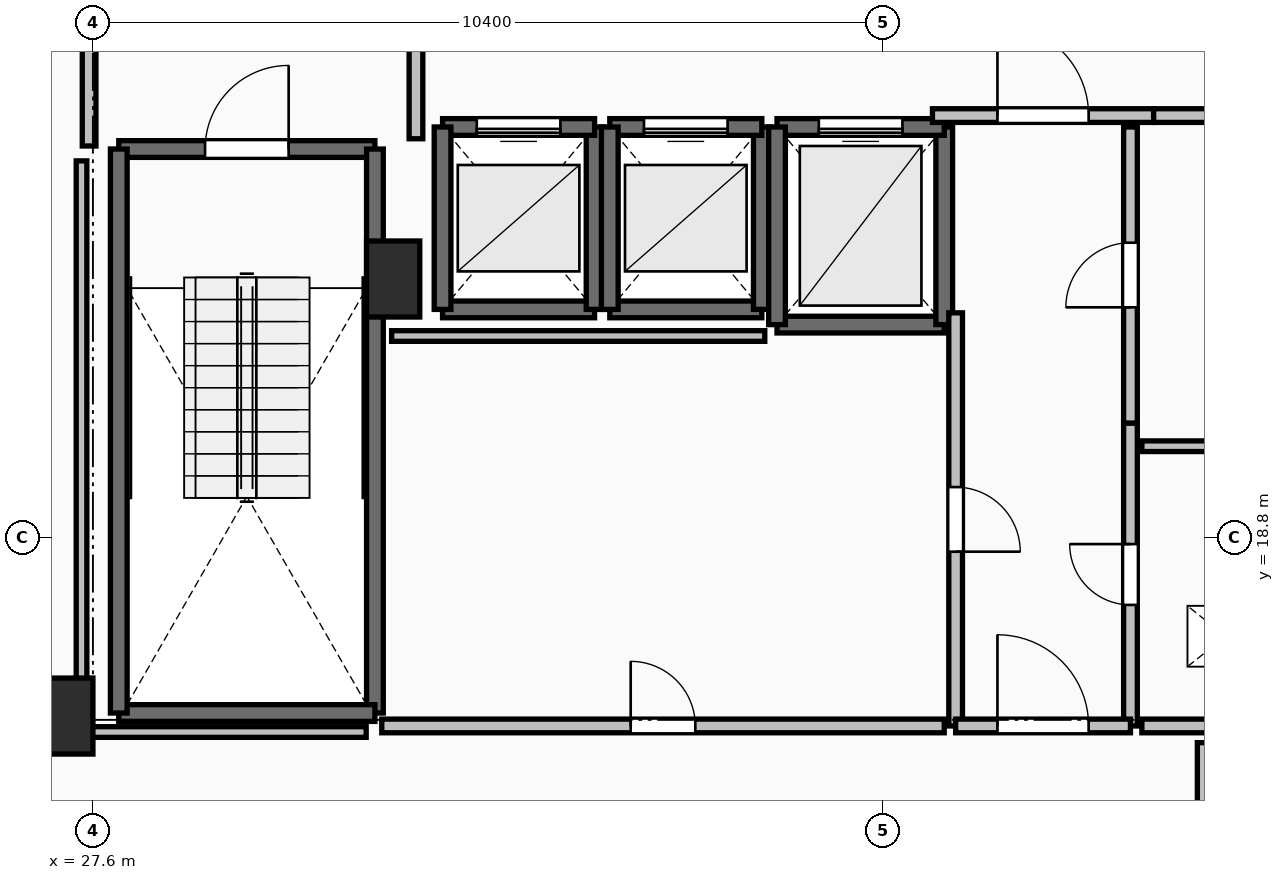
"""IFC4 building model, lengths in metres.
Left out: names, types, materials, properties, quantities, classifications, styles, units other than length and angle.
Written with IfcOpenShell. Run it as: python <this file> out.ifc"""

import sys

from ifc_helpers import new_model, si_unit, direction, frame, frame_2d, origin, origin_2d, place, context, subcontext, project, spatial, rectangle, extrude, element, fill, save


model = new_model("IFC4")
c1 = context("Model", 3, precision=1e-05, world=origin(), true_north=direction((0.0, 1.0)))
c2 = subcontext(c1, "Body", "Model", "MODEL_VIEW")
j1 = project(units=[si_unit("LENGTHUNIT", "METRE"), si_unit("PLANEANGLEUNIT", "RADIAN")], contexts=[c1])
p1 = place(None, origin())
s1 = spatial("IfcSite", under=j1, at=p1, CompositionType="ELEMENT")
p2 = place(p1, origin())
s2 = spatial("IfcBuilding", under=s1, at=p2, CompositionType="ELEMENT")
p3 = place(p2, frame((0.0, 0.0, 207.2)))
s3 = spatial("IfcBuildingStorey", under=s2, at=p3, CompositionType="ELEMENT", Elevation=207.2)
for number, where, z_axis, x_axis in (
    (1, (27.25, 16.45, 0.0), (0.0, 0.0, 1.0), (1.0, 0.0, 0.0)),
    (2, (31.55, 22.2, 0.0), (0.0, 0.0, 1.0), (1.0, 0.0, 0.0)),
):
    element("IfcColumn", number, at=place(p3, frame(where, z_axis=z_axis, x_axis=x_axis)), inside=s3, PredefinedType="PILASTER", context=c2, shape_type="SweptSolid", body=[
        extrude(rectangle(XDim=0.7, YDim=1.0, at=origin_2d()), origin(), (0.0, 0.0, 1.0), 3.55),
    ])
p4 = place(p3, frame((27.94, 23.91, 0.0), z_axis=(0.0, 0.0, 1.0), x_axis=(1.0, 0.0, 0.0)))
e3 = element("IfcWall", 3, at=p4, inside=s3, PredefinedType="SOLIDWALL", context=c2, shape_type="SweptSolid", body=[
    extrude(rectangle(XDim=3.37, YDim=0.22, at=frame_2d((1.685, 0.0))), origin(), (0.0, 0.0, 1.0), 3.29),
])
p5 = place(p4, frame((1.135, 0.0, 0.0)))
e4 = element("IfcOpeningElement", 4, at=p5, cuts=e3, PredefinedType="OPENING", context=c2, shape_type="SweptSolid", body=[
    extrude(rectangle(XDim=1.1, YDim=2.15, at=frame_2d((0.55, 1.075))), frame((0.0, 0.125, 0.0), z_axis=(0.0, -1.0, 0.0), x_axis=(1.0, 0.0, 0.0)), (0.0, 0.0, 1.0), 0.25),
])
p6 = place(p3, frame((31.31, 23.91, 0.0), z_axis=(0.0, 0.0, 1.0), x_axis=(0.0, -1.0, 0.0)))
e5 = element("IfcWall", 5, at=p6, inside=s3, PredefinedType="SOLIDWALL", context=c2, shape_type="SweptSolid", body=[
    extrude(rectangle(XDim=7.42, YDim=0.22, at=frame_2d((3.71, 0.0))), origin(), (0.0, 0.0, 1.0), 3.29),
])
p7 = place(p3, frame((31.31, 16.49, 0.0), z_axis=(0.0, 0.0, 1.0), x_axis=(-1.0, 0.0, 0.0)))
e6 = element("IfcWall", 6, at=p7, inside=s3, PredefinedType="SOLIDWALL", context=c2, shape_type="SweptSolid", body=[
    extrude(rectangle(XDim=3.37, YDim=0.22, at=frame_2d((1.685, 0.0))), origin(), (0.0, 0.0, 1.0), 3.29),
])
p8 = place(p3, frame((27.94, 16.49, 0.0), z_axis=(0.0, 0.0, 1.0), x_axis=(0.0, 1.0, 0.0)))
e7 = element("IfcWall", 7, at=p8, inside=s3, PredefinedType="SOLIDWALL", context=c2, shape_type="SweptSolid", body=[
    extrude(rectangle(XDim=7.42, YDim=0.22, at=frame_2d((3.71, 0.0))), origin(), (0.0, 0.0, 1.0), 3.29),
])
p9 = place(p3, frame((32.2, 21.8, 0.0), z_axis=(0.0, 0.0, 1.0), x_axis=(1.0, 0.0, 0.0)))
e8 = element("IfcWall", 8, at=p9, inside=s3, PredefinedType="SOLIDWALL", context=c2, shape_type="SweptSolid", body=[
    extrude(rectangle(XDim=2.0, YDim=0.22, at=frame_2d((1.0, 0.0))), origin(), (0.0, 0.0, 1.0), 3.29),
])
p10 = place(p3, frame((34.2, 21.8, 0.0), z_axis=(0.0, 0.0, 1.0), x_axis=(0.0, 1.0, 0.0)))
e9 = element("IfcWall", 9, at=p10, inside=s3, PredefinedType="SOLIDWALL", context=c2, shape_type="SweptSolid", body=[
    extrude(rectangle(XDim=2.4, YDim=0.22, at=frame_2d((1.2, 0.0))), origin(), (0.0, 0.0, 1.0), 3.29),
])
p11 = place(p3, frame((34.2, 24.2, 0.0), z_axis=(0.0, 0.0, 1.0), x_axis=(-1.0, 0.0, 0.0)))
e10 = element("IfcWall", 10, at=p11, inside=s3, PredefinedType="SOLIDWALL", context=c2, shape_type="SweptSolid", body=[
    extrude(rectangle(XDim=2.0, YDim=0.22, at=frame_2d((1.0, 0.0))), origin(), (0.0, 0.0, 1.0), 3.29),
])
p12 = place(p11, frame((0.45, 0.0, 0.0)))
e11 = element("IfcOpeningElement", 11, at=p12, cuts=e10, PredefinedType="OPENING", context=c2, shape_type="SweptSolid", body=[
    extrude(rectangle(XDim=1.1, YDim=2.2, at=frame_2d((0.55, 1.1))), frame((0.0, 0.125, 0.0), z_axis=(0.0, -1.0, 0.0), x_axis=(1.0, 0.0, 0.0)), (0.0, 0.0, 1.0), 0.25),
])
p13 = place(p3, frame((32.2, 24.2, 0.0), z_axis=(0.0, 0.0, 1.0), x_axis=(0.0, -1.0, 0.0)))
e12 = element("IfcWall", 12, at=p13, inside=s3, PredefinedType="SOLIDWALL", context=c2, shape_type="SweptSolid", body=[
    extrude(rectangle(XDim=2.4, YDim=0.22, at=frame_2d((1.2, 0.0))), origin(), (0.0, 0.0, 1.0), 3.29),
])
p14 = place(p3, frame((34.4, 21.8, 0.0), z_axis=(0.0, 0.0, 1.0), x_axis=(1.0, 0.0, 0.0)))
e13 = element("IfcWall", 13, at=p14, inside=s3, PredefinedType="SOLIDWALL", context=c2, shape_type="SweptSolid", body=[
    extrude(rectangle(XDim=2.0, YDim=0.22, at=frame_2d((1.0, 0.0))), origin(), (0.0, 0.0, 1.0), 3.29),
])
p15 = place(p3, frame((36.4, 21.8, 0.0), z_axis=(0.0, 0.0, 1.0), x_axis=(0.0, 1.0, 0.0)))
e14 = element("IfcWall", 14, at=p15, inside=s3, PredefinedType="SOLIDWALL", context=c2, shape_type="SweptSolid", body=[
    extrude(rectangle(XDim=2.4, YDim=0.22, at=frame_2d((1.2, 0.0))), origin(), (0.0, 0.0, 1.0), 3.29),
])
p16 = place(p3, frame((36.4, 24.2, 0.0), z_axis=(0.0, 0.0, 1.0), x_axis=(-1.0, 0.0, 0.0)))
e15 = element("IfcWall", 15, at=p16, inside=s3, PredefinedType="SOLIDWALL", context=c2, shape_type="SweptSolid", body=[
    extrude(rectangle(XDim=2.0, YDim=0.22, at=frame_2d((1.0, 0.0))), origin(), (0.0, 0.0, 1.0), 3.29),
])
p17 = place(p16, frame((0.45, 0.0, 0.0)))
e16 = element("IfcOpeningElement", 16, at=p17, cuts=e15, PredefinedType="OPENING", context=c2, shape_type="SweptSolid", body=[
    extrude(rectangle(XDim=1.1, YDim=2.2, at=frame_2d((0.55, 1.1))), frame((0.0, 0.125, 0.0), z_axis=(0.0, -1.0, 0.0), x_axis=(1.0, 0.0, 0.0)), (0.0, 0.0, 1.0), 0.25),
])
p18 = place(p3, frame((34.4, 24.2, 0.0), z_axis=(0.0, 0.0, 1.0), x_axis=(0.0, -1.0, 0.0)))
e17 = element("IfcWall", 17, at=p18, inside=s3, PredefinedType="SOLIDWALL", context=c2, shape_type="SweptSolid", body=[
    extrude(rectangle(XDim=2.4, YDim=0.22, at=frame_2d((1.2, 0.0))), origin(), (0.0, 0.0, 1.0), 3.29),
])
p19 = place(p3, frame((36.6, 21.6, 0.0), z_axis=(0.0, 0.0, 1.0), x_axis=(1.0, 0.0, 0.0)))
e18 = element("IfcWall", 18, at=p19, inside=s3, PredefinedType="SOLIDWALL", context=c2, shape_type="SweptSolid", body=[
    extrude(rectangle(XDim=2.2, YDim=0.22, at=frame_2d((1.1, 0.0))), origin(), (0.0, 0.0, 1.0), 3.29),
])
p20 = place(p3, frame((38.8, 21.6, 0.0), z_axis=(0.0, 0.0, 1.0), x_axis=(0.0, 1.0, 0.0)))
e19 = element("IfcWall", 19, at=p20, inside=s3, PredefinedType="SOLIDWALL", context=c2, shape_type="SweptSolid", body=[
    extrude(rectangle(XDim=2.6, YDim=0.22, at=frame_2d((1.3, 0.0))), origin(), (0.0, 0.0, 1.0), 3.29),
])
p21 = place(p3, frame((38.8, 24.2, 0.0), z_axis=(0.0, 0.0, 1.0), x_axis=(-1.0, 0.0, 0.0)))
e20 = element("IfcWall", 20, at=p21, inside=s3, PredefinedType="SOLIDWALL", context=c2, shape_type="SweptSolid", body=[
    extrude(rectangle(XDim=2.2, YDim=0.22, at=frame_2d((1.1, 0.0))), origin(), (0.0, 0.0, 1.0), 3.29),
])
p22 = place(p21, frame((0.55, 0.0, 0.0)))
e21 = element("IfcOpeningElement", 21, at=p22, cuts=e20, PredefinedType="OPENING", context=c2, shape_type="SweptSolid", body=[
    extrude(rectangle(XDim=1.1, YDim=2.2, at=frame_2d((0.55, 1.1))), frame((0.0, 0.125, 0.0), z_axis=(0.0, -1.0, 0.0), x_axis=(1.0, 0.0, 0.0)), (0.0, 0.0, 1.0), 0.25),
])
p23 = place(p3, frame((36.6, 24.2, 0.0), z_axis=(0.0, 0.0, 1.0), x_axis=(0.0, -1.0, 0.0)))
e22 = element("IfcWall", 22, at=p23, inside=s3, PredefinedType="SOLIDWALL", context=c2, shape_type="SweptSolid", body=[
    extrude(rectangle(XDim=2.6, YDim=0.22, at=frame_2d((1.3, 0.0))), origin(), (0.0, 0.0, 1.0), 3.29),
])
p24 = place(p3, frame((31.85, 24.045, 0.0), z_axis=(0.0, 0.0, 1.0), x_axis=(0.0, 1.0, 0.0)))
e23 = element("IfcWall", 23, at=p24, inside=s3, PredefinedType="PARTITIONING", context=c2, shape_type="SweptSolid", body=[
    extrude(rectangle(XDim=3.91, YDim=0.18, at=frame_2d((1.955, 0.0))), origin(), (0.0, 0.0, 1.0), 3.29),
])
p25 = place(p24, frame((1.355, 0.0, 0.0)))
e24 = element("IfcOpeningElement", 24, at=p25, cuts=e23, PredefinedType="OPENING", context=c2, shape_type="SweptSolid", body=[
    extrude(rectangle(XDim=1.2, YDim=2.15, at=frame_2d((0.6, 1.075))), frame((0.0, 0.105, 0.0), z_axis=(0.0, -1.0, 0.0), x_axis=(1.0, 0.0, 0.0)), (0.0, 0.0, 1.0), 0.21),
])
p26 = place(p3, frame((27.55, 28.0, 0.0), z_axis=(0.0, 0.0, 1.0), x_axis=(0.0, -1.0, 0.0)))
e25 = element("IfcWall", 25, at=p26, inside=s3, PredefinedType="PARTITIONING", context=c2, shape_type="SweptSolid", body=[
    extrude(rectangle(XDim=4.05, YDim=0.18, at=frame_2d((2.025, 0.0))), origin(), (0.0, 0.0, 1.0), 3.29),
])
p27 = place(p26, frame((1.425, 0.0, 0.0)))
e26 = element("IfcOpeningElement", 26, at=p27, cuts=e25, PredefinedType="OPENING", context=c2, shape_type="SweptSolid", body=[
    extrude(rectangle(XDim=1.2, YDim=2.15, at=frame_2d((0.6, 1.075))), frame((0.0, 0.105, 0.0), z_axis=(0.0, -1.0, 0.0), x_axis=(1.0, 0.0, 0.0)), (0.0, 0.0, 1.0), 0.21),
])
p28 = place(p3, frame((38.645, 24.35, 0.0), z_axis=(0.0, 0.0, 1.0), x_axis=(1.0, 0.0, 0.0)))
e27 = element("IfcWall", 27, at=p28, inside=s3, PredefinedType="PARTITIONING", context=c2, shape_type="SweptSolid", body=[
    extrude(rectangle(XDim=2.91, YDim=0.18, at=frame_2d((1.455, 0.0))), origin(), (0.0, 0.0, 1.0), 3.29),
])
p29 = place(p28, frame((0.855, 0.0, 0.0)))
e28 = element("IfcOpeningElement", 28, at=p29, cuts=e27, PredefinedType="OPENING", context=c2, shape_type="SweptSolid", body=[
    extrude(rectangle(XDim=1.2, YDim=2.15, at=frame_2d((0.6, 1.075))), frame((0.0, 0.105, 0.0), z_axis=(0.0, -1.0, 0.0), x_axis=(1.0, 0.0, 0.0)), (0.0, 0.0, 1.0), 0.21),
])
p30 = place(p3, frame((41.555, 24.35, 0.0), z_axis=(0.0, 0.0, 1.0), x_axis=(1.0, 0.0, 0.0)))
e29 = element("IfcWall", 29, at=p30, inside=s3, PredefinedType="PARTITIONING", context=c2, shape_type="SweptSolid", body=[
    extrude(rectangle(XDim=2.445, YDim=0.18, at=frame_2d((1.223, 0.0))), origin(), (0.0, 0.0, 1.0), 3.29),
])
p31 = place(p30, frame((0.798, 0.0, 0.0)))
e30 = element("IfcOpeningElement", 30, at=p31, cuts=e29, PredefinedType="OPENING", context=c2, shape_type="SweptSolid", body=[
    extrude(rectangle(XDim=0.85, YDim=2.1, at=frame_2d((0.425, 1.05))), frame((0.0, 0.105, 0.0), z_axis=(0.0, -1.0, 0.0), x_axis=(1.0, 0.0, 0.0)), (0.0, 0.0, 1.0), 0.21),
])
p32 = place(p3, frame((41.25, 16.32, 0.0), z_axis=(0.0, 0.0, 1.0), x_axis=(0.0, 1.0, 0.0)))
e31 = element("IfcWall", 31, at=p32, inside=s3, PredefinedType="PARTITIONING", context=c2, shape_type="SweptSolid", body=[
    extrude(rectangle(XDim=3.985, YDim=0.18, at=frame_2d((1.992, 0.0))), origin(), (0.0, 0.0, 1.0), 3.29),
])
p33 = place(p32, frame((1.593, 0.0, 0.0)))
e32 = element("IfcOpeningElement", 32, at=p33, cuts=e31, PredefinedType="OPENING", context=c2, shape_type="SweptSolid", body=[
    extrude(rectangle(XDim=0.8, YDim=2.05, at=frame_2d((0.4, 1.025))), frame((0.0, 0.105, 0.0), z_axis=(0.0, -1.0, 0.0), x_axis=(1.0, 0.0, 0.0)), (0.0, 0.0, 1.0), 0.21),
])
p34 = place(p3, frame((41.25, 20.305, 0.0), z_axis=(0.0, 0.0, 1.0), x_axis=(0.0, 1.0, 0.0)))
e33 = element("IfcWall", 33, at=p34, inside=s3, PredefinedType="PARTITIONING", context=c2, shape_type="SweptSolid", body=[
    extrude(rectangle(XDim=3.895, YDim=0.18, at=frame_2d((1.948, 0.0))), origin(), (0.0, 0.0, 1.0), 3.29),
])
p35 = place(p34, frame((1.522, 0.0, 0.0)))
e34 = element("IfcOpeningElement", 34, at=p35, cuts=e33, PredefinedType="OPENING", context=c2, shape_type="SweptSolid", body=[
    extrude(rectangle(XDim=0.85, YDim=2.1, at=frame_2d((0.425, 1.05))), frame((0.0, 0.105, 0.0), z_axis=(0.0, -1.0, 0.0), x_axis=(1.0, 0.0, 0.0)), (0.0, 0.0, 1.0), 0.21),
])
p36 = place(p3, frame((38.95, 21.755, 0.0), z_axis=(0.0, 0.0, 1.0), x_axis=(0.0, -1.0, 0.0)))
e35 = element("IfcWall", 35, at=p36, inside=s3, PredefinedType="PARTITIONING", context=c2, shape_type="SweptSolid", body=[
    extrude(rectangle(XDim=5.435, YDim=0.18, at=frame_2d((2.717, 0.0))), origin(), (0.0, 0.0, 1.0), 3.29),
])
p37 = place(p36, frame((2.292, 0.0, 0.0)))
e36 = element("IfcOpeningElement", 36, at=p37, cuts=e35, PredefinedType="OPENING", context=c2, shape_type="SweptSolid", body=[
    extrude(rectangle(XDim=0.85, YDim=2.1, at=frame_2d((0.425, 1.05))), frame((0.0, 0.105, 0.0), z_axis=(0.0, -1.0, 0.0), x_axis=(1.0, 0.0, 0.0)), (0.0, 0.0, 1.0), 0.21),
])
p38 = place(p3, frame((38.95, 16.32, 0.0), z_axis=(0.0, 0.0, 1.0), x_axis=(1.0, 0.0, 0.0)))
e37 = element("IfcWall", 37, at=p38, inside=s3, PredefinedType="PARTITIONING", context=c2, shape_type="SweptSolid", body=[
    extrude(rectangle(XDim=2.3, YDim=0.18, at=frame_2d((1.15, 0.0))), origin(), (0.0, 0.0, 1.0), 3.29),
])
p39 = place(p38, frame((0.55, 0.0, 0.0)))
e38 = element("IfcOpeningElement", 38, at=p39, cuts=e37, PredefinedType="OPENING", context=c2, shape_type="SweptSolid", body=[
    extrude(rectangle(XDim=1.2, YDim=2.15, at=frame_2d((0.6, 1.075))), frame((0.0, 0.105, 0.0), z_axis=(0.0, -1.0, 0.0), x_axis=(1.0, 0.0, 0.0)), (0.0, 0.0, 1.0), 0.21),
])
p40 = place(p3, frame((44.6, 20.0, 0.0), z_axis=(0.0, 0.0, 1.0), x_axis=(-1.0, 0.0, 0.0)))
e39 = element("IfcWall", 39, at=p40, inside=s3, PredefinedType="PARTITIONING", context=c2, shape_type="SweptSolid", body=[
    extrude(rectangle(XDim=3.2, YDim=0.14, at=frame_2d((1.6, 0.0))), origin(), (0.0, 0.0, 1.0), 3.29),
])
p41 = place(p3, frame((41.4, 16.32, 0.0), z_axis=(0.0, 0.0, 1.0), x_axis=(1.0, 0.0, 0.0)))
e40 = element("IfcWall", 40, at=p41, inside=s3, PredefinedType="PARTITIONING", context=c2, shape_type="SweptSolid", body=[
    extrude(rectangle(XDim=3.2, YDim=0.18, at=frame_2d((1.6, 0.0))), origin(), (0.0, 0.0, 1.0), 3.29),
])
p42 = place(p41, frame((1.2, 0.0, 0.0)))
e41 = element("IfcOpeningElement", 41, at=p42, cuts=e40, PredefinedType="OPENING", context=c2, shape_type="SweptSolid", body=[
    extrude(rectangle(XDim=0.8, YDim=2.05, at=frame_2d((0.4, 1.025))), frame((0.0, 0.105, 0.0), z_axis=(0.0, -1.0, 0.0), x_axis=(1.0, 0.0, 0.0)), (0.0, 0.0, 1.0), 0.21),
])
p43 = place(p3, frame((31.4, 16.32, 0.0), z_axis=(0.0, 0.0, 1.0), x_axis=(1.0, 0.0, 0.0)))
e42 = element("IfcWall", 42, at=p43, inside=s3, PredefinedType="PARTITIONING", context=c2, shape_type="SweptSolid", body=[
    extrude(rectangle(XDim=7.4, YDim=0.18, at=frame_2d((3.7, 0.0))), origin(), (0.0, 0.0, 1.0), 3.29),
])
p44 = place(p43, frame((3.275, 0.0, 0.0)))
e43 = element("IfcOpeningElement", 43, at=p44, cuts=e42, PredefinedType="OPENING", context=c2, shape_type="SweptSolid", body=[
    extrude(rectangle(XDim=0.85, YDim=2.1, at=frame_2d((0.425, 1.05))), frame((0.0, 0.105, 0.0), z_axis=(0.0, -1.0, 0.0), x_axis=(1.0, 0.0, 0.0)), (0.0, 0.0, 1.0), 0.21),
])
p45 = place(p3, frame((36.439, 21.45, 0.0), z_axis=(0.0, 0.0, 1.0), x_axis=(-1.0, 0.0, 0.0)))
e44 = element("IfcWall", 44, at=p45, inside=s3, PredefinedType="PARTITIONING", context=c2, shape_type="SweptSolid", body=[
    extrude(rectangle(XDim=4.909, YDim=0.14, at=frame_2d((2.455, 0.0))), origin(), (0.0, 0.0, 1.0), 3.29),
])
p46 = place(p3, frame((27.45, 23.754, 0.0), z_axis=(0.0, 0.0, 1.0), x_axis=(0.0, -1.0, 0.0)))
e45 = element("IfcWall", 45, at=p46, inside=s3, PredefinedType="PARTITIONING", context=c2, shape_type="SweptSolid", body=[
    extrude(rectangle(XDim=7.514, YDim=0.14, at=frame_2d((3.757, 0.0))), origin(), (0.0, 0.0, 1.0), 2.482),
])
p47 = place(p3, frame((27.45, 16.24, 0.0), z_axis=(0.0, 0.0, 1.0), x_axis=(1.0, 0.0, 0.0)))
e46 = element("IfcWall", 46, at=p47, inside=s3, PredefinedType="PARTITIONING", context=c2, shape_type="SweptSolid", body=[
    extrude(rectangle(XDim=3.745, YDim=0.14, at=frame_2d((1.873, 0.0))), origin(), (0.0, 0.0, 1.0), 2.482),
])
p48 = place(p3, frame((42.2, 16.1, 0.0), z_axis=(0.0, 0.0, 1.0), x_axis=(0.0, -1.0, 0.0)))
e47 = element("IfcWall", 47, at=p48, inside=s3, PredefinedType="PARTITIONING", context=c2, shape_type="SweptSolid", body=[
    extrude(rectangle(XDim=1.83, YDim=0.14, at=frame_2d((0.915, 0.0))), origin(), (0.0, 0.0, 1.0), 3.29),
])
p49 = place(p5, origin())
e48 = element("IfcDoor", 48, at=p49, inside=s3, OperationType="SINGLE_SWING_RIGHT", PredefinedType="DOOR", context=c2, shape_type="SweptSolid", body=[
    extrude(rectangle(XDim=1.1, YDim=2.15, at=frame_2d((0.55, 1.075))), frame((0.0, 0.025, 0.0), z_axis=(0.0, -1.0, 0.0), x_axis=(1.0, 0.0, 0.0)), (0.0, 0.0, 1.0), 0.05),
])
fill(e4, e48)
p50 = place(p12, origin())
e49 = element("IfcDoor", 49, at=p50, inside=s3, OperationType="SLIDING_TO_LEFT", PredefinedType="DOOR", context=c2, shape_type="SweptSolid", body=[
    extrude(rectangle(XDim=1.1, YDim=2.2, at=frame_2d((0.55, 1.1))), frame((0.0, 0.025, 0.0), z_axis=(0.0, -1.0, 0.0), x_axis=(1.0, 0.0, 0.0)), (0.0, 0.0, 1.0), 0.05),
])
fill(e11, e49)
p51 = place(p17, origin())
e50 = element("IfcDoor", 50, at=p51, inside=s3, OperationType="SLIDING_TO_LEFT", PredefinedType="DOOR", context=c2, shape_type="SweptSolid", body=[
    extrude(rectangle(XDim=1.1, YDim=2.2, at=frame_2d((0.55, 1.1))), frame((0.0, 0.025, 0.0), z_axis=(0.0, -1.0, 0.0), x_axis=(1.0, 0.0, 0.0)), (0.0, 0.0, 1.0), 0.05),
])
fill(e16, e50)
p52 = place(p22, origin())
e51 = element("IfcDoor", 51, at=p52, inside=s3, OperationType="SLIDING_TO_LEFT", PredefinedType="DOOR", context=c2, shape_type="SweptSolid", body=[
    extrude(rectangle(XDim=1.1, YDim=2.2, at=frame_2d((0.55, 1.1))), frame((0.0, 0.025, 0.0), z_axis=(0.0, -1.0, 0.0), x_axis=(1.0, 0.0, 0.0)), (0.0, 0.0, 1.0), 0.05),
])
fill(e21, e51)
p53 = place(p29, origin())
e52 = element("IfcDoor", 52, at=p53, inside=s3, OperationType="SINGLE_SWING_LEFT", PredefinedType="DOOR", context=c2, shape_type="SweptSolid", body=[
    extrude(rectangle(XDim=1.2, YDim=2.15, at=frame_2d((0.6, 1.075))), frame((0.0, 0.025, 0.0), z_axis=(0.0, -1.0, 0.0), x_axis=(1.0, 0.0, 0.0)), (0.0, 0.0, 1.0), 0.05),
])
fill(e28, e52)
p54 = place(p33, origin())
e53 = element("IfcDoor", 53, at=p54, inside=s3, OperationType="SINGLE_SWING_RIGHT", PredefinedType="DOOR", context=c2, shape_type="SweptSolid", body=[
    extrude(rectangle(XDim=0.8, YDim=2.05, at=frame_2d((0.4, 1.025))), frame((0.0, 0.025, 0.0), z_axis=(0.0, -1.0, 0.0), x_axis=(1.0, 0.0, 0.0)), (0.0, 0.0, 1.0), 0.05),
])
fill(e32, e53)
p55 = place(p35, origin())
e54 = element("IfcDoor", 54, at=p55, inside=s3, OperationType="SINGLE_SWING_LEFT", PredefinedType="DOOR", context=c2, shape_type="SweptSolid", body=[
    extrude(rectangle(XDim=0.85, YDim=2.1, at=frame_2d((0.425, 1.05))), frame((0.0, 0.025, 0.0), z_axis=(0.0, -1.0, 0.0), x_axis=(1.0, 0.0, 0.0)), (0.0, 0.0, 1.0), 0.05),
])
fill(e34, e54)
p56 = place(p37, origin())
e55 = element("IfcDoor", 55, at=p56, inside=s3, OperationType="SINGLE_SWING_RIGHT", PredefinedType="DOOR", context=c2, shape_type="SweptSolid", body=[
    extrude(rectangle(XDim=0.85, YDim=2.1, at=frame_2d((0.425, 1.05))), frame((0.0, 0.025, 0.0), z_axis=(0.0, -1.0, 0.0), x_axis=(1.0, 0.0, 0.0)), (0.0, 0.0, 1.0), 0.05),
])
fill(e36, e55)
p57 = place(p39, origin())
e56 = element("IfcDoor", 56, at=p57, inside=s3, OperationType="SINGLE_SWING_LEFT", PredefinedType="DOOR", context=c2, shape_type="SweptSolid", body=[
    extrude(rectangle(XDim=1.2, YDim=2.15, at=frame_2d((0.6, 1.075))), frame((0.0, 0.025, 0.0), z_axis=(0.0, -1.0, 0.0), x_axis=(1.0, 0.0, 0.0)), (0.0, 0.0, 1.0), 0.05),
])
fill(e38, e56)
p58 = place(p44, origin())
e57 = element("IfcDoor", 57, at=p58, inside=s3, OperationType="SINGLE_SWING_LEFT", PredefinedType="DOOR", context=c2, shape_type="SweptSolid", body=[
    extrude(rectangle(XDim=0.85, YDim=2.1, at=frame_2d((0.425, 1.05))), frame((0.0, 0.025, 0.0), z_axis=(0.0, -1.0, 0.0), x_axis=(1.0, 0.0, 0.0)), (0.0, 0.0, 1.0), 0.05),
])
fill(e43, e57)
save(model, sys.argv[1])
